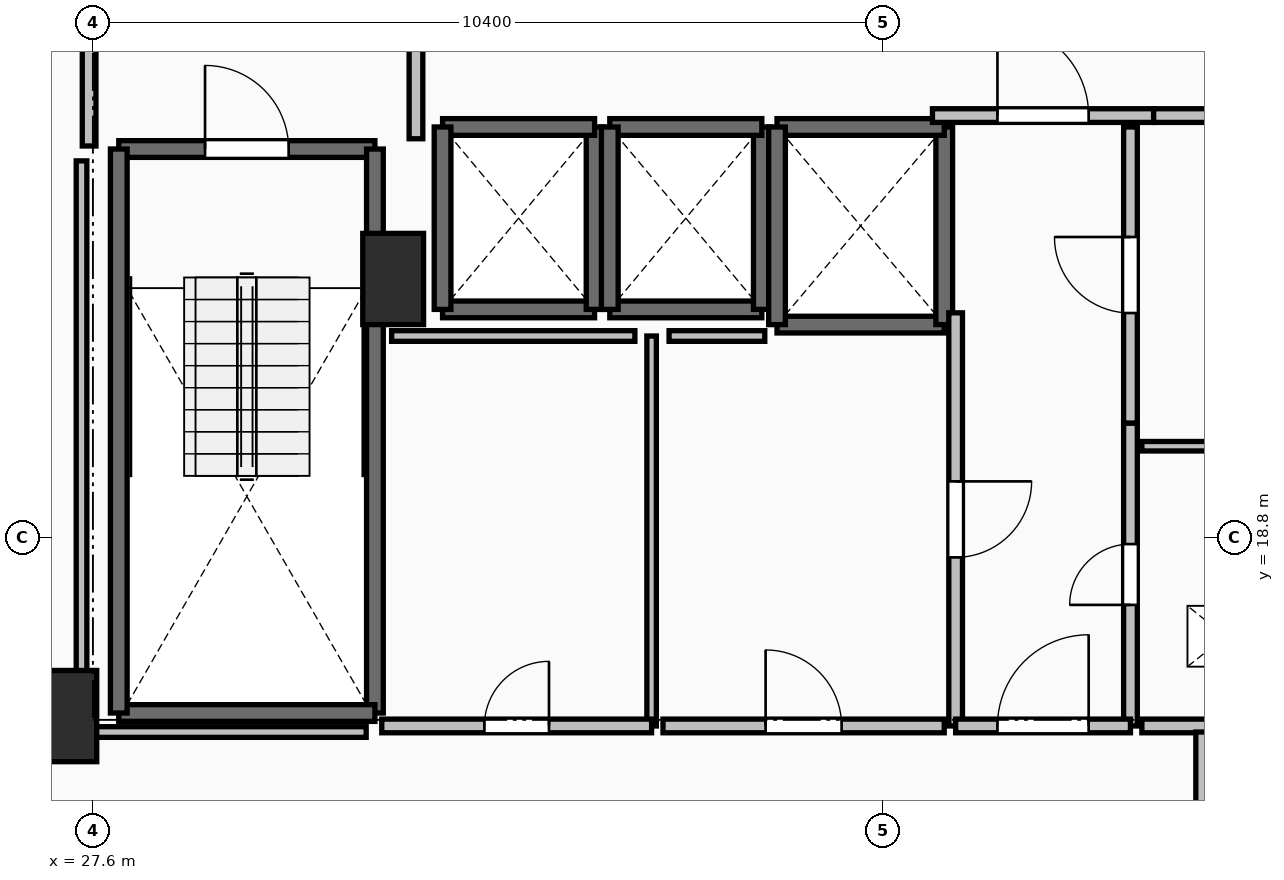
"""IFC4 building model, lengths in metres.
Left out: names, types, materials, properties, quantities, classifications, styles, units other than length and angle.
Written with IfcOpenShell. Run it as: python <this file> out.ifc"""

import sys

from ifc_helpers import new_model, si_unit, direction, frame, frame_2d, origin, origin_2d, place, context, subcontext, project, spatial, rectangle, extrude, element, fill, save


model = new_model("IFC4")
c1 = context("Model", 3, precision=1e-05, world=origin(), true_north=direction((0.0, 1.0)))
c2 = subcontext(c1, "Body", "Model", "MODEL_VIEW")
j1 = project(units=[si_unit("LENGTHUNIT", "METRE"), si_unit("PLANEANGLEUNIT", "RADIAN")], contexts=[c1])
p1 = place(None, origin())
s1 = spatial("IfcSite", under=j1, at=p1, CompositionType="ELEMENT")
p2 = place(p1, origin())
s2 = spatial("IfcBuilding", under=s1, at=p2, CompositionType="ELEMENT")
p3 = place(p2, frame((0.0, 0.0, 103.3)))
s3 = spatial("IfcBuildingStorey", under=s2, at=p3, CompositionType="ELEMENT", Elevation=103.3)
for number, where, z_axis, x_axis in (
    (1, (27.25, 16.45, 0.0), (0.0, 0.0, 1.0), (1.0, 0.0, 0.0)),
    (2, (31.55, 22.2, 0.0), (0.0, 0.0, 1.0), (1.0, 0.0, 0.0)),
):
    element("IfcColumn", number, at=place(p3, frame(where, z_axis=z_axis, x_axis=x_axis)), inside=s3, PredefinedType="PILASTER", context=c2, shape_type="SweptSolid", body=[
        extrude(rectangle(XDim=0.8, YDim=1.2, at=origin_2d()), origin(), (0.0, 0.0, 1.0), 3.5),
    ])
p4 = place(p3, frame((27.94, 23.91, 0.0), z_axis=(0.0, 0.0, 1.0), x_axis=(1.0, 0.0, 0.0)))
e3 = element("IfcWall", 3, at=p4, inside=s3, PredefinedType="SOLIDWALL", context=c2, shape_type="SweptSolid", body=[
    extrude(rectangle(XDim=3.37, YDim=0.22, at=frame_2d((1.685, 0.0))), origin(), (0.0, 0.0, 1.0), 3.24),
])
p5 = place(p4, frame((1.135, 0.0, 0.0)))
e4 = element("IfcOpeningElement", 4, at=p5, cuts=e3, PredefinedType="OPENING", context=c2, shape_type="SweptSolid", body=[
    extrude(rectangle(XDim=1.1, YDim=2.15, at=frame_2d((0.55, 1.075))), frame((0.0, 0.125, 0.0), z_axis=(0.0, -1.0, 0.0), x_axis=(1.0, 0.0, 0.0)), (0.0, 0.0, 1.0), 0.25),
])
p6 = place(p3, frame((31.31, 23.91, 0.0), z_axis=(0.0, 0.0, 1.0), x_axis=(0.0, -1.0, 0.0)))
e5 = element("IfcWall", 5, at=p6, inside=s3, PredefinedType="SOLIDWALL", context=c2, shape_type="SweptSolid", body=[
    extrude(rectangle(XDim=7.42, YDim=0.22, at=frame_2d((3.71, 0.0))), origin(), (0.0, 0.0, 1.0), 3.24),
])
p7 = place(p3, frame((31.31, 16.49, 0.0), z_axis=(0.0, 0.0, 1.0), x_axis=(-1.0, 0.0, 0.0)))
e6 = element("IfcWall", 6, at=p7, inside=s3, PredefinedType="SOLIDWALL", context=c2, shape_type="SweptSolid", body=[
    extrude(rectangle(XDim=3.37, YDim=0.22, at=frame_2d((1.685, 0.0))), origin(), (0.0, 0.0, 1.0), 3.24),
])
p8 = place(p3, frame((27.94, 16.49, 0.0), z_axis=(0.0, 0.0, 1.0), x_axis=(0.0, 1.0, 0.0)))
e7 = element("IfcWall", 7, at=p8, inside=s3, PredefinedType="SOLIDWALL", context=c2, shape_type="SweptSolid", body=[
    extrude(rectangle(XDim=7.42, YDim=0.22, at=frame_2d((3.71, 0.0))), origin(), (0.0, 0.0, 1.0), 3.24),
])
p9 = place(p3, frame((32.2, 21.8, 0.0), z_axis=(0.0, 0.0, 1.0), x_axis=(1.0, 0.0, 0.0)))
e8 = element("IfcWall", 8, at=p9, inside=s3, PredefinedType="SOLIDWALL", context=c2, shape_type="SweptSolid", body=[
    extrude(rectangle(XDim=2.0, YDim=0.22, at=frame_2d((1.0, 0.0))), origin(), (0.0, 0.0, 1.0), 3.24),
])
p10 = place(p3, frame((34.2, 21.8, 0.0), z_axis=(0.0, 0.0, 1.0), x_axis=(0.0, 1.0, 0.0)))
e9 = element("IfcWall", 9, at=p10, inside=s3, PredefinedType="SOLIDWALL", context=c2, shape_type="SweptSolid", body=[
    extrude(rectangle(XDim=2.4, YDim=0.22, at=frame_2d((1.2, 0.0))), origin(), (0.0, 0.0, 1.0), 3.24),
])
p11 = place(p3, frame((34.2, 24.2, 0.0), z_axis=(0.0, 0.0, 1.0), x_axis=(-1.0, 0.0, 0.0)))
e10 = element("IfcWall", 10, at=p11, inside=s3, PredefinedType="SOLIDWALL", context=c2, shape_type="SweptSolid", body=[
    extrude(rectangle(XDim=2.0, YDim=0.22, at=frame_2d((1.0, 0.0))), origin(), (0.0, 0.0, 1.0), 3.24),
])
p12 = place(p3, frame((32.2, 24.2, 0.0), z_axis=(0.0, 0.0, 1.0), x_axis=(0.0, -1.0, 0.0)))
e11 = element("IfcWall", 11, at=p12, inside=s3, PredefinedType="SOLIDWALL", context=c2, shape_type="SweptSolid", body=[
    extrude(rectangle(XDim=2.4, YDim=0.22, at=frame_2d((1.2, 0.0))), origin(), (0.0, 0.0, 1.0), 3.24),
])
p13 = place(p3, frame((34.4, 21.8, 0.0), z_axis=(0.0, 0.0, 1.0), x_axis=(1.0, 0.0, 0.0)))
e12 = element("IfcWall", 12, at=p13, inside=s3, PredefinedType="SOLIDWALL", context=c2, shape_type="SweptSolid", body=[
    extrude(rectangle(XDim=2.0, YDim=0.22, at=frame_2d((1.0, 0.0))), origin(), (0.0, 0.0, 1.0), 3.24),
])
p14 = place(p3, frame((36.4, 21.8, 0.0), z_axis=(0.0, 0.0, 1.0), x_axis=(0.0, 1.0, 0.0)))
e13 = element("IfcWall", 13, at=p14, inside=s3, PredefinedType="SOLIDWALL", context=c2, shape_type="SweptSolid", body=[
    extrude(rectangle(XDim=2.4, YDim=0.22, at=frame_2d((1.2, 0.0))), origin(), (0.0, 0.0, 1.0), 3.24),
])
p15 = place(p3, frame((36.4, 24.2, 0.0), z_axis=(0.0, 0.0, 1.0), x_axis=(-1.0, 0.0, 0.0)))
e14 = element("IfcWall", 14, at=p15, inside=s3, PredefinedType="SOLIDWALL", context=c2, shape_type="SweptSolid", body=[
    extrude(rectangle(XDim=2.0, YDim=0.22, at=frame_2d((1.0, 0.0))), origin(), (0.0, 0.0, 1.0), 3.24),
])
p16 = place(p3, frame((34.4, 24.2, 0.0), z_axis=(0.0, 0.0, 1.0), x_axis=(0.0, -1.0, 0.0)))
e15 = element("IfcWall", 15, at=p16, inside=s3, PredefinedType="SOLIDWALL", context=c2, shape_type="SweptSolid", body=[
    extrude(rectangle(XDim=2.4, YDim=0.22, at=frame_2d((1.2, 0.0))), origin(), (0.0, 0.0, 1.0), 3.24),
])
p17 = place(p3, frame((36.6, 21.6, 0.0), z_axis=(0.0, 0.0, 1.0), x_axis=(1.0, 0.0, 0.0)))
e16 = element("IfcWall", 16, at=p17, inside=s3, PredefinedType="SOLIDWALL", context=c2, shape_type="SweptSolid", body=[
    extrude(rectangle(XDim=2.2, YDim=0.22, at=frame_2d((1.1, 0.0))), origin(), (0.0, 0.0, 1.0), 3.24),
])
p18 = place(p3, frame((38.8, 21.6, 0.0), z_axis=(0.0, 0.0, 1.0), x_axis=(0.0, 1.0, 0.0)))
e17 = element("IfcWall", 17, at=p18, inside=s3, PredefinedType="SOLIDWALL", context=c2, shape_type="SweptSolid", body=[
    extrude(rectangle(XDim=2.6, YDim=0.22, at=frame_2d((1.3, 0.0))), origin(), (0.0, 0.0, 1.0), 3.24),
])
p19 = place(p3, frame((38.8, 24.2, 0.0), z_axis=(0.0, 0.0, 1.0), x_axis=(-1.0, 0.0, 0.0)))
e18 = element("IfcWall", 18, at=p19, inside=s3, PredefinedType="SOLIDWALL", context=c2, shape_type="SweptSolid", body=[
    extrude(rectangle(XDim=2.2, YDim=0.22, at=frame_2d((1.1, 0.0))), origin(), (0.0, 0.0, 1.0), 3.24),
])
p20 = place(p3, frame((36.6, 24.2, 0.0), z_axis=(0.0, 0.0, 1.0), x_axis=(0.0, -1.0, 0.0)))
e19 = element("IfcWall", 19, at=p20, inside=s3, PredefinedType="SOLIDWALL", context=c2, shape_type="SweptSolid", body=[
    extrude(rectangle(XDim=2.6, YDim=0.22, at=frame_2d((1.3, 0.0))), origin(), (0.0, 0.0, 1.0), 3.24),
])
p21 = place(p3, frame((31.85, 24.045, 0.0), z_axis=(0.0, 0.0, 1.0), x_axis=(0.0, 1.0, 0.0)))
e20 = element("IfcWall", 20, at=p21, inside=s3, PredefinedType="PARTITIONING", context=c2, shape_type="SweptSolid", body=[
    extrude(rectangle(XDim=3.91, YDim=0.18, at=frame_2d((1.955, 0.0))), origin(), (0.0, 0.0, 1.0), 3.24),
])
p22 = place(p21, frame((1.355, 0.0, 0.0)))
e21 = element("IfcOpeningElement", 21, at=p22, cuts=e20, PredefinedType="OPENING", context=c2, shape_type="SweptSolid", body=[
    extrude(rectangle(XDim=1.2, YDim=2.15, at=frame_2d((0.6, 1.075))), frame((0.0, 0.105, 0.0), z_axis=(0.0, -1.0, 0.0), x_axis=(1.0, 0.0, 0.0)), (0.0, 0.0, 1.0), 0.21),
])
p23 = place(p3, frame((27.55, 28.0, 0.0), z_axis=(0.0, 0.0, 1.0), x_axis=(0.0, -1.0, 0.0)))
e22 = element("IfcWall", 22, at=p23, inside=s3, PredefinedType="PARTITIONING", context=c2, shape_type="SweptSolid", body=[
    extrude(rectangle(XDim=4.05, YDim=0.18, at=frame_2d((2.025, 0.0))), origin(), (0.0, 0.0, 1.0), 3.24),
])
p24 = place(p23, frame((1.425, 0.0, 0.0)))
e23 = element("IfcOpeningElement", 23, at=p24, cuts=e22, PredefinedType="OPENING", context=c2, shape_type="SweptSolid", body=[
    extrude(rectangle(XDim=1.2, YDim=2.15, at=frame_2d((0.6, 1.075))), frame((0.0, 0.105, 0.0), z_axis=(0.0, -1.0, 0.0), x_axis=(1.0, 0.0, 0.0)), (0.0, 0.0, 1.0), 0.21),
])
p25 = place(p3, frame((38.645, 24.35, 0.0), z_axis=(0.0, 0.0, 1.0), x_axis=(1.0, 0.0, 0.0)))
e24 = element("IfcWall", 24, at=p25, inside=s3, PredefinedType="PARTITIONING", context=c2, shape_type="SweptSolid", body=[
    extrude(rectangle(XDim=2.91, YDim=0.18, at=frame_2d((1.455, 0.0))), origin(), (0.0, 0.0, 1.0), 3.24),
])
p26 = place(p25, frame((0.855, 0.0, 0.0)))
e25 = element("IfcOpeningElement", 25, at=p26, cuts=e24, PredefinedType="OPENING", context=c2, shape_type="SweptSolid", body=[
    extrude(rectangle(XDim=1.2, YDim=2.15, at=frame_2d((0.6, 1.075))), frame((0.0, 0.105, 0.0), z_axis=(0.0, -1.0, 0.0), x_axis=(1.0, 0.0, 0.0)), (0.0, 0.0, 1.0), 0.21),
])
p27 = place(p3, frame((41.555, 24.35, 0.0), z_axis=(0.0, 0.0, 1.0), x_axis=(1.0, 0.0, 0.0)))
e26 = element("IfcWall", 26, at=p27, inside=s3, PredefinedType="PARTITIONING", context=c2, shape_type="SweptSolid", body=[
    extrude(rectangle(XDim=2.445, YDim=0.18, at=frame_2d((1.223, 0.0))), origin(), (0.0, 0.0, 1.0), 3.24),
])
p28 = place(p27, frame((0.722, 0.0, 0.0)))
e27 = element("IfcOpeningElement", 27, at=p28, cuts=e26, PredefinedType="OPENING", context=c2, shape_type="SweptSolid", body=[
    extrude(rectangle(XDim=1.0, YDim=2.15, at=frame_2d((0.5, 1.075))), frame((0.0, 0.105, 0.0), z_axis=(0.0, -1.0, 0.0), x_axis=(1.0, 0.0, 0.0)), (0.0, 0.0, 1.0), 0.21),
])
p29 = place(p3, frame((41.25, 16.32, 0.0), z_axis=(0.0, 0.0, 1.0), x_axis=(0.0, 1.0, 0.0)))
e28 = element("IfcWall", 28, at=p29, inside=s3, PredefinedType="PARTITIONING", context=c2, shape_type="SweptSolid", body=[
    extrude(rectangle(XDim=3.985, YDim=0.18, at=frame_2d((1.992, 0.0))), origin(), (0.0, 0.0, 1.0), 3.24),
])
p30 = place(p29, frame((1.593, 0.0, 0.0)))
e29 = element("IfcOpeningElement", 29, at=p30, cuts=e28, PredefinedType="OPENING", context=c2, shape_type="SweptSolid", body=[
    extrude(rectangle(XDim=0.8, YDim=2.05, at=frame_2d((0.4, 1.025))), frame((0.0, 0.105, 0.0), z_axis=(0.0, -1.0, 0.0), x_axis=(1.0, 0.0, 0.0)), (0.0, 0.0, 1.0), 0.21),
])
p31 = place(p3, frame((41.25, 20.305, 0.0), z_axis=(0.0, 0.0, 1.0), x_axis=(0.0, 1.0, 0.0)))
e30 = element("IfcWall", 30, at=p31, inside=s3, PredefinedType="PARTITIONING", context=c2, shape_type="SweptSolid", body=[
    extrude(rectangle(XDim=3.895, YDim=0.18, at=frame_2d((1.948, 0.0))), origin(), (0.0, 0.0, 1.0), 3.24),
])
p32 = place(p31, frame((1.448, 0.0, 0.0)))
e31 = element("IfcOpeningElement", 31, at=p32, cuts=e30, PredefinedType="OPENING", context=c2, shape_type="SweptSolid", body=[
    extrude(rectangle(XDim=1.0, YDim=2.15, at=frame_2d((0.5, 1.075))), frame((0.0, 0.105, 0.0), z_axis=(0.0, -1.0, 0.0), x_axis=(1.0, 0.0, 0.0)), (0.0, 0.0, 1.0), 0.21),
])
p33 = place(p3, frame((38.95, 21.755, 0.0), z_axis=(0.0, 0.0, 1.0), x_axis=(0.0, -1.0, 0.0)))
e32 = element("IfcWall", 32, at=p33, inside=s3, PredefinedType="PARTITIONING", context=c2, shape_type="SweptSolid", body=[
    extrude(rectangle(XDim=5.435, YDim=0.18, at=frame_2d((2.717, 0.0))), origin(), (0.0, 0.0, 1.0), 3.24),
])
p34 = place(p33, frame((2.218, 0.0, 0.0)))
e33 = element("IfcOpeningElement", 33, at=p34, cuts=e32, PredefinedType="OPENING", context=c2, shape_type="SweptSolid", body=[
    extrude(rectangle(XDim=1.0, YDim=2.15, at=frame_2d((0.5, 1.075))), frame((0.0, 0.105, 0.0), z_axis=(0.0, -1.0, 0.0), x_axis=(1.0, 0.0, 0.0)), (0.0, 0.0, 1.0), 0.21),
])
p35 = place(p3, frame((38.95, 16.32, 0.0), z_axis=(0.0, 0.0, 1.0), x_axis=(1.0, 0.0, 0.0)))
e34 = element("IfcWall", 34, at=p35, inside=s3, PredefinedType="PARTITIONING", context=c2, shape_type="SweptSolid", body=[
    extrude(rectangle(XDim=2.3, YDim=0.18, at=frame_2d((1.15, 0.0))), origin(), (0.0, 0.0, 1.0), 3.24),
])
p36 = place(p35, frame((0.55, 0.0, 0.0)))
e35 = element("IfcOpeningElement", 35, at=p36, cuts=e34, PredefinedType="OPENING", context=c2, shape_type="SweptSolid", body=[
    extrude(rectangle(XDim=1.2, YDim=2.15, at=frame_2d((0.6, 1.075))), frame((0.0, 0.105, 0.0), z_axis=(0.0, -1.0, 0.0), x_axis=(1.0, 0.0, 0.0)), (0.0, 0.0, 1.0), 0.21),
])
p37 = place(p3, frame((44.6, 20.0, 0.0), z_axis=(0.0, 0.0, 1.0), x_axis=(-1.0, 0.0, 0.0)))
e36 = element("IfcWall", 36, at=p37, inside=s3, PredefinedType="PARTITIONING", context=c2, shape_type="SweptSolid", body=[
    extrude(rectangle(XDim=3.2, YDim=0.125, at=frame_2d((1.6, 0.0))), origin(), (0.0, 0.0, 1.0), 3.24),
])
p38 = place(p3, frame((41.4, 16.32, 0.0), z_axis=(0.0, 0.0, 1.0), x_axis=(1.0, 0.0, 0.0)))
e37 = element("IfcWall", 37, at=p38, inside=s3, PredefinedType="PARTITIONING", context=c2, shape_type="SweptSolid", body=[
    extrude(rectangle(XDim=3.2, YDim=0.18, at=frame_2d((1.6, 0.0))), origin(), (0.0, 0.0, 1.0), 3.24),
])
p39 = place(p38, frame((1.2, 0.0, 0.0)))
e38 = element("IfcOpeningElement", 38, at=p39, cuts=e37, PredefinedType="OPENING", context=c2, shape_type="SweptSolid", body=[
    extrude(rectangle(XDim=0.8, YDim=2.05, at=frame_2d((0.4, 1.025))), frame((0.0, 0.105, 0.0), z_axis=(0.0, -1.0, 0.0), x_axis=(1.0, 0.0, 0.0)), (0.0, 0.0, 1.0), 0.21),
])
p40 = place(p3, frame((34.95, 16.32, 0.0), z_axis=(0.0, 0.0, 1.0), x_axis=(0.0, 1.0, 0.0)))
e39 = element("IfcWall", 39, at=p40, inside=s3, PredefinedType="PARTITIONING", context=c2, shape_type="SweptSolid", body=[
    extrude(rectangle(XDim=5.13, YDim=0.125, at=frame_2d((2.565, 0.0))), origin(), (0.0, 0.0, 1.0), 3.24),
])
p41 = place(p3, frame((31.4, 16.32, 0.0), z_axis=(0.0, 0.0, 1.0), x_axis=(1.0, 0.0, 0.0)))
e40 = element("IfcWall", 40, at=p41, inside=s3, PredefinedType="PARTITIONING", context=c2, shape_type="SweptSolid", body=[
    extrude(rectangle(XDim=3.55, YDim=0.18, at=frame_2d((1.775, 0.0))), origin(), (0.0, 0.0, 1.0), 3.24),
])
p42 = place(p41, frame((1.35, 0.0, 0.0)))
e41 = element("IfcOpeningElement", 41, at=p42, cuts=e40, PredefinedType="OPENING", context=c2, shape_type="SweptSolid", body=[
    extrude(rectangle(XDim=0.85, YDim=2.1, at=frame_2d((0.425, 1.05))), frame((0.0, 0.105, 0.0), z_axis=(0.0, -1.0, 0.0), x_axis=(1.0, 0.0, 0.0)), (0.0, 0.0, 1.0), 0.21),
])
p43 = place(p3, frame((35.1, 16.32, 0.0), z_axis=(0.0, 0.0, 1.0), x_axis=(1.0, 0.0, 0.0)))
e42 = element("IfcWall", 42, at=p43, inside=s3, PredefinedType="PARTITIONING", context=c2, shape_type="SweptSolid", body=[
    extrude(rectangle(XDim=3.7, YDim=0.18, at=frame_2d((1.85, 0.0))), origin(), (0.0, 0.0, 1.0), 3.24),
])
p44 = place(p43, frame((1.35, 0.0, 0.0)))
e43 = element("IfcOpeningElement", 43, at=p44, cuts=e42, PredefinedType="OPENING", context=c2, shape_type="SweptSolid", body=[
    extrude(rectangle(XDim=1.0, YDim=2.15, at=frame_2d((0.5, 1.075))), frame((0.0, 0.105, 0.0), z_axis=(0.0, -1.0, 0.0), x_axis=(1.0, 0.0, 0.0)), (0.0, 0.0, 1.0), 0.21),
])
p45 = place(p3, frame((42.2, 14.1, 0.0), z_axis=(0.0, 0.0, 1.0), x_axis=(0.0, 1.0, 0.0)))
e44 = element("IfcWall", 44, at=p45, inside=s3, PredefinedType="PARTITIONING", context=c2, shape_type="SweptSolid", body=[
    extrude(rectangle(XDim=2.14, YDim=0.18, at=frame_2d((1.07, 0.0))), origin(), (0.0, 0.0, 1.0), 3.24),
])
p46 = place(p3, frame((34.73, 21.45, 0.0), z_axis=(0.0, 0.0, 1.0), x_axis=(-1.0, 0.0, 0.0)))
e45 = element("IfcWall", 45, at=p46, inside=s3, PredefinedType="PARTITIONING", context=c2, shape_type="SweptSolid", body=[
    extrude(rectangle(XDim=3.2, YDim=0.14, at=frame_2d((1.6, 0.0))), origin(), (0.0, 0.0, 1.0), 3.24),
])
p47 = place(p3, frame((36.439, 21.45, 0.0), z_axis=(0.0, 0.0, 1.0), x_axis=(-1.0, 0.0, 0.0)))
e46 = element("IfcWall", 46, at=p47, inside=s3, PredefinedType="PARTITIONING", context=c2, shape_type="SweptSolid", body=[
    extrude(rectangle(XDim=1.259, YDim=0.14, at=frame_2d((0.629, 0.0))), origin(), (0.0, 0.0, 1.0), 3.24),
])
p48 = place(p3, frame((31.195, 16.24, 0.0), z_axis=(0.0, 0.0, 1.0), x_axis=(-1.0, 0.0, 0.0)))
e47 = element("IfcWall", 47, at=p48, inside=s3, PredefinedType="PARTITIONING", context=c2, shape_type="SweptSolid", body=[
    extrude(rectangle(XDim=3.745, YDim=0.14, at=frame_2d((1.873, 0.0))), origin(), (0.0, 0.0, 1.0), 2.432),
])
p49 = place(p3, frame((27.45, 16.24, 0.0), z_axis=(0.0, 0.0, 1.0), x_axis=(0.0, 1.0, 0.0)))
e48 = element("IfcWall", 48, at=p49, inside=s3, PredefinedType="PARTITIONING", context=c2, shape_type="SweptSolid", body=[
    extrude(rectangle(XDim=7.514, YDim=0.14, at=frame_2d((3.757, 0.0))), origin(), (0.0, 0.0, 1.0), 2.432),
])
p50 = place(p5, origin())
e49 = element("IfcDoor", 49, at=p50, inside=s3, OperationType="SINGLE_SWING_LEFT", PredefinedType="DOOR", context=c2, shape_type="SweptSolid", body=[
    extrude(rectangle(XDim=1.1, YDim=2.15, at=frame_2d((0.55, 1.075))), frame((0.0, 0.025, 0.0), z_axis=(0.0, -1.0, 0.0), x_axis=(1.0, 0.0, 0.0)), (0.0, 0.0, 1.0), 0.05),
])
fill(e4, e49)
p51 = place(p26, origin())
e50 = element("IfcDoor", 50, at=p51, inside=s3, OperationType="SINGLE_SWING_LEFT", PredefinedType="DOOR", context=c2, shape_type="SweptSolid", body=[
    extrude(rectangle(XDim=1.2, YDim=2.15, at=frame_2d((0.6, 1.075))), frame((0.0, 0.025, 0.0), z_axis=(0.0, -1.0, 0.0), x_axis=(1.0, 0.0, 0.0)), (0.0, 0.0, 1.0), 0.05),
])
fill(e25, e50)
p52 = place(p30, origin())
e51 = element("IfcDoor", 51, at=p52, inside=s3, OperationType="SINGLE_SWING_LEFT", PredefinedType="DOOR", context=c2, shape_type="SweptSolid", body=[
    extrude(rectangle(XDim=0.8, YDim=2.05, at=frame_2d((0.4, 1.025))), frame((0.0, 0.025, 0.0), z_axis=(0.0, -1.0, 0.0), x_axis=(1.0, 0.0, 0.0)), (0.0, 0.0, 1.0), 0.05),
])
fill(e29, e51)
p53 = place(p32, origin())
e52 = element("IfcDoor", 52, at=p53, inside=s3, OperationType="SINGLE_SWING_RIGHT", PredefinedType="DOOR", context=c2, shape_type="SweptSolid", body=[
    extrude(rectangle(XDim=1.0, YDim=2.15, at=frame_2d((0.5, 1.075))), frame((0.0, 0.025, 0.0), z_axis=(0.0, -1.0, 0.0), x_axis=(1.0, 0.0, 0.0)), (0.0, 0.0, 1.0), 0.05),
])
fill(e31, e52)
p54 = place(p34, origin())
e53 = element("IfcDoor", 53, at=p54, inside=s3, OperationType="SINGLE_SWING_LEFT", PredefinedType="DOOR", context=c2, shape_type="SweptSolid", body=[
    extrude(rectangle(XDim=1.0, YDim=2.15, at=frame_2d((0.5, 1.075))), frame((0.0, 0.025, 0.0), z_axis=(0.0, -1.0, 0.0), x_axis=(1.0, 0.0, 0.0)), (0.0, 0.0, 1.0), 0.05),
])
fill(e33, e53)
p55 = place(p36, origin())
e54 = element("IfcDoor", 54, at=p55, inside=s3, OperationType="SINGLE_SWING_RIGHT", PredefinedType="DOOR", context=c2, shape_type="SweptSolid", body=[
    extrude(rectangle(XDim=1.2, YDim=2.15, at=frame_2d((0.6, 1.075))), frame((0.0, 0.025, 0.0), z_axis=(0.0, -1.0, 0.0), x_axis=(1.0, 0.0, 0.0)), (0.0, 0.0, 1.0), 0.05),
])
fill(e35, e54)
p56 = place(p42, origin())
e55 = element("IfcDoor", 55, at=p56, inside=s3, OperationType="SINGLE_SWING_RIGHT", PredefinedType="DOOR", context=c2, shape_type="SweptSolid", body=[
    extrude(rectangle(XDim=0.85, YDim=2.1, at=frame_2d((0.425, 1.05))), frame((0.0, 0.025, 0.0), z_axis=(0.0, -1.0, 0.0), x_axis=(1.0, 0.0, 0.0)), (0.0, 0.0, 1.0), 0.05),
])
fill(e41, e55)
p57 = place(p44, origin())
e56 = element("IfcDoor", 56, at=p57, inside=s3, OperationType="SINGLE_SWING_LEFT", PredefinedType="DOOR", context=c2, shape_type="SweptSolid", body=[
    extrude(rectangle(XDim=1.0, YDim=2.15, at=frame_2d((0.5, 1.075))), frame((0.0, 0.025, 0.0), z_axis=(0.0, -1.0, 0.0), x_axis=(1.0, 0.0, 0.0)), (0.0, 0.0, 1.0), 0.05),
])
fill(e43, e56)
save(model, sys.argv[1])
